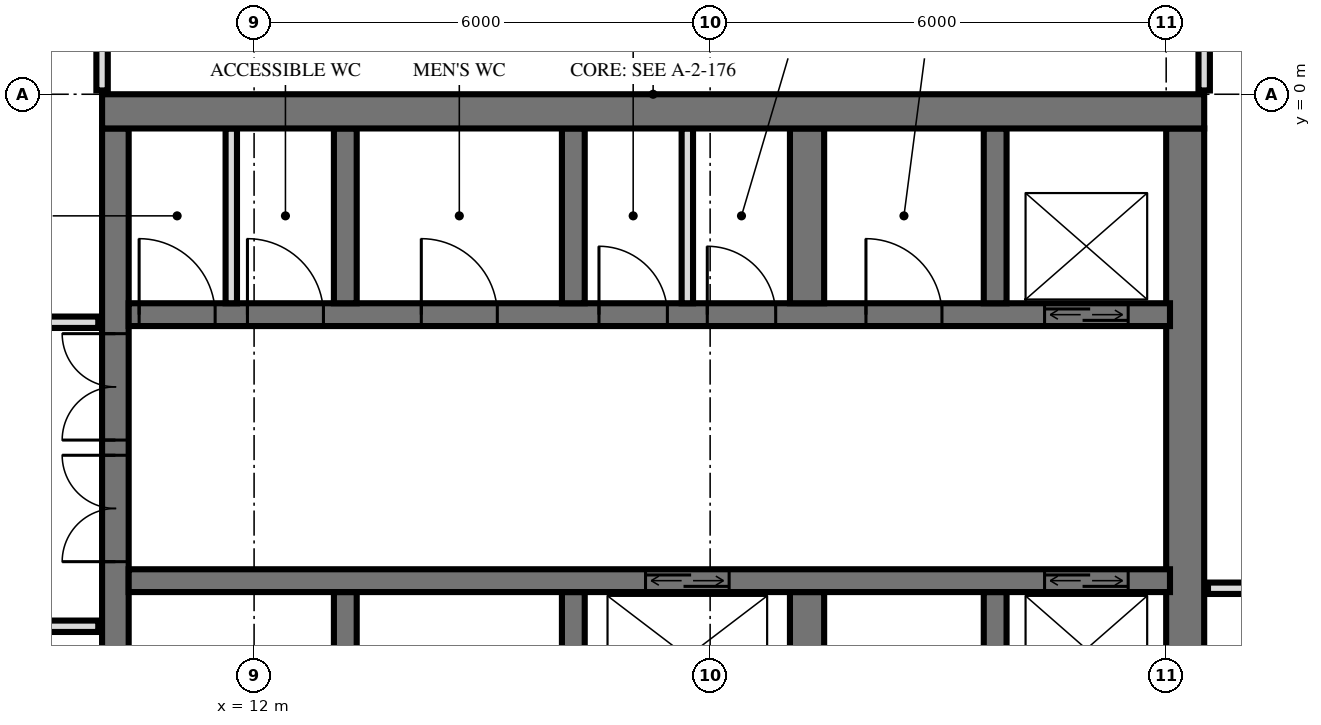
"""IFC4 building model, lengths in metres.
Left out: names, types, materials, properties, quantities, classifications, styles, units other than length and angle.
Written with IfcOpenShell. Run it as: python <this file> out.ifc"""

import sys

from ifc_helpers import new_model, si_unit, direction, frame, frame_2d, origin, place, context, subcontext, project, spatial, rectangle, extrude, element, fill, save


model = new_model("IFC4")
c1 = context("Model", 3, precision=1e-05, world=origin(), true_north=direction((0.0, 1.0)))
c2 = subcontext(c1, "Body", "Model", "MODEL_VIEW")
j1 = project(units=[si_unit("LENGTHUNIT", "METRE"), si_unit("PLANEANGLEUNIT", "RADIAN")], contexts=[c1])
p1 = place(None, origin())
s1 = spatial("IfcSite", under=j1, at=p1, CompositionType="ELEMENT")
p2 = place(p1, origin())
s2 = spatial("IfcBuilding", under=s1, at=p2, CompositionType="ELEMENT")
p3 = place(p2, frame((0.0, 0.0, 159.6)))
s3 = spatial("IfcBuildingStorey", under=s2, at=p3, CompositionType="ELEMENT", Elevation=159.6)
p4 = place(p3, frame((10.0, -0.225, 0.0), z_axis=(0.0, 0.0, 1.0), x_axis=(1.0, 0.0, 0.0)))
e1 = element("IfcWall", 1, at=p4, inside=s3, PredefinedType="SHEAR", context=c2, shape_type="SweptSolid", body=[
    extrude(rectangle(XDim=14.5, YDim=0.45, at=frame_2d((7.25, 0.0))), origin(), (0.0, 0.0, 1.0), 3.6),
])
p5 = place(p3, frame((10.175, -14.55, 0.0), z_axis=(0.0, 0.0, 1.0), x_axis=(0.0, 1.0, 0.0)))
e2 = element("IfcWall", 2, at=p5, inside=s3, PredefinedType="SHEAR", context=c2, shape_type="SweptSolid", body=[
    extrude(rectangle(XDim=14.1, YDim=0.35, at=frame_2d((7.05, 0.0))), origin(), (0.0, 0.0, 1.0), 3.6),
])
p6 = place(p5, frame((8.4, 0.0, 0.0)))
e3 = element("IfcOpeningElement", 3, at=p6, cuts=e2, PredefinedType="OPENING", context=c2, shape_type="SweptSolid", body=[
    extrude(rectangle(XDim=1.4, YDim=2.4, at=frame_2d((0.7, 1.2))), frame((0.0, 0.185, 0.0), z_axis=(0.0, -1.0, 0.0), x_axis=(1.0, 0.0, 0.0)), (0.0, 0.0, 1.0), 0.37),
])
p7 = place(p5, frame((10.0, 0.0, 0.0)))
e4 = element("IfcOpeningElement", 4, at=p7, cuts=e2, PredefinedType="OPENING", context=c2, shape_type="SweptSolid", body=[
    extrude(rectangle(XDim=1.4, YDim=2.4, at=frame_2d((0.7, 1.2))), frame((0.0, 0.185, 0.0), z_axis=(0.0, -1.0, 0.0), x_axis=(1.0, 0.0, 0.0)), (0.0, 0.0, 1.0), 0.37),
])
p8 = place(p5, frame((4.0, 0.0, 0.0)))
e5 = element("IfcOpeningElement", 5, at=p8, cuts=e2, PredefinedType="OPENING", context=c2, shape_type="SweptSolid", body=[
    extrude(rectangle(XDim=1.2, YDim=2.1, at=frame_2d((0.6, 1.05))), frame((0.0, 0.185, 0.0), z_axis=(0.0, -1.0, 0.0), x_axis=(1.0, 0.0, 0.0)), (0.0, 0.0, 1.0), 0.37),
])
p9 = place(p3, frame((24.25, -14.55, 0.0), z_axis=(0.0, 0.0, 1.0), x_axis=(0.0, 1.0, 0.0)))
e6 = element("IfcWall", 6, at=p9, inside=s3, PredefinedType="SHEAR", context=c2, shape_type="SweptSolid", body=[
    extrude(rectangle(XDim=14.1, YDim=0.5, at=frame_2d((7.05, 0.0))), origin(), (0.0, 0.0, 1.0), 3.6),
])
p10 = place(p3, frame((10.35, -2.9, 0.0), z_axis=(0.0, 0.0, 1.0), x_axis=(1.0, 0.0, 0.0)))
e7 = element("IfcWall", 7, at=p10, inside=s3, PredefinedType="SHEAR", context=c2, shape_type="SweptSolid", body=[
    extrude(rectangle(XDim=13.7, YDim=0.3, at=frame_2d((6.85, 0.0))), origin(), (0.0, 0.0, 1.0), 3.6),
])
p11 = place(p10, frame((12.05, 0.0, 0.0)))
e8 = element("IfcOpeningElement", 8, at=p11, cuts=e7, PredefinedType="OPENING", context=c2, shape_type="SweptSolid", body=[
    extrude(rectangle(XDim=1.1, YDim=2.1, at=frame_2d((0.55, 1.05))), frame((0.0, 0.16, 0.0), z_axis=(0.0, -1.0, 0.0), x_axis=(1.0, 0.0, 0.0)), (0.0, 0.0, 1.0), 0.32),
])
p12 = place(p10, frame((6.188, 0.0, 0.0)))
e9 = element("IfcOpeningElement", 9, at=p12, cuts=e7, PredefinedType="OPENING", context=c2, shape_type="SweptSolid", body=[
    extrude(rectangle(XDim=0.9, YDim=2.1, at=frame_2d((0.45, 1.05))), frame((0.0, 0.16, 0.0), z_axis=(0.0, -1.0, 0.0), x_axis=(1.0, 0.0, 0.0)), (0.0, 0.0, 1.0), 0.32),
])
p13 = place(p10, frame((7.613, 0.0, 0.0)))
e10 = element("IfcOpeningElement", 10, at=p13, cuts=e7, PredefinedType="OPENING", context=c2, shape_type="SweptSolid", body=[
    extrude(rectangle(XDim=0.9, YDim=2.1, at=frame_2d((0.45, 1.05))), frame((0.0, 0.16, 0.0), z_axis=(0.0, -1.0, 0.0), x_axis=(1.0, 0.0, 0.0)), (0.0, 0.0, 1.0), 0.32),
])
p14 = place(p10, frame((0.137, 0.0, 0.0)))
e11 = element("IfcOpeningElement", 11, at=p14, cuts=e7, PredefinedType="OPENING", context=c2, shape_type="SweptSolid", body=[
    extrude(rectangle(XDim=1.0, YDim=2.1, at=frame_2d((0.5, 1.05))), frame((0.0, 0.16, 0.0), z_axis=(0.0, -1.0, 0.0), x_axis=(1.0, 0.0, 0.0)), (0.0, 0.0, 1.0), 0.32),
])
p15 = place(p10, frame((1.562, 0.0, 0.0)))
e12 = element("IfcOpeningElement", 12, at=p15, cuts=e7, PredefinedType="OPENING", context=c2, shape_type="SweptSolid", body=[
    extrude(rectangle(XDim=1.0, YDim=2.1, at=frame_2d((0.5, 1.05))), frame((0.0, 0.16, 0.0), z_axis=(0.0, -1.0, 0.0), x_axis=(1.0, 0.0, 0.0)), (0.0, 0.0, 1.0), 0.32),
])
p16 = place(p10, frame((3.85, 0.0, 0.0)))
e13 = element("IfcOpeningElement", 13, at=p16, cuts=e7, PredefinedType="OPENING", context=c2, shape_type="SweptSolid", body=[
    extrude(rectangle(XDim=1.0, YDim=2.1, at=frame_2d((0.5, 1.05))), frame((0.0, 0.16, 0.0), z_axis=(0.0, -1.0, 0.0), x_axis=(1.0, 0.0, 0.0)), (0.0, 0.0, 1.0), 0.32),
])
p17 = place(p10, frame((9.7, 0.0, 0.0)))
e14 = element("IfcOpeningElement", 14, at=p17, cuts=e7, PredefinedType="OPENING", context=c2, shape_type="SweptSolid", body=[
    extrude(rectangle(XDim=1.0, YDim=2.1, at=frame_2d((0.5, 1.05))), frame((0.0, 0.16, 0.0), z_axis=(0.0, -1.0, 0.0), x_axis=(1.0, 0.0, 0.0)), (0.0, 0.0, 1.0), 0.32),
])
p18 = place(p3, frame((10.35, -6.4, 0.0), z_axis=(0.0, 0.0, 1.0), x_axis=(1.0, 0.0, 0.0)))
e15 = element("IfcWall", 15, at=p18, inside=s3, PredefinedType="SHEAR", context=c2, shape_type="SweptSolid", body=[
    extrude(rectangle(XDim=13.7, YDim=0.3, at=frame_2d((6.85, 0.0))), origin(), (0.0, 0.0, 1.0), 3.6),
])
p19 = place(p18, frame((12.05, 0.0, 0.0)))
e16 = element("IfcOpeningElement", 16, at=p19, cuts=e15, PredefinedType="OPENING", context=c2, shape_type="SweptSolid", body=[
    extrude(rectangle(XDim=1.1, YDim=2.1, at=frame_2d((0.55, 1.05))), frame((0.0, 0.16, 0.0), z_axis=(0.0, -1.0, 0.0), x_axis=(1.0, 0.0, 0.0)), (0.0, 0.0, 1.0), 0.32),
])
p20 = place(p18, frame((6.8, 0.0, 0.0)))
e17 = element("IfcOpeningElement", 17, at=p20, cuts=e15, PredefinedType="OPENING", context=c2, shape_type="SweptSolid", body=[
    extrude(rectangle(XDim=1.1, YDim=2.1, at=frame_2d((0.55, 1.05))), frame((0.0, 0.16, 0.0), z_axis=(0.0, -1.0, 0.0), x_axis=(1.0, 0.0, 0.0)), (0.0, 0.0, 1.0), 0.32),
])
for number, where, z_axis, x_axis in (
    (18, (13.2, -2.75, 0.0), (0.0, 0.0, 1.0), (0.0, 1.0, 0.0)),
    (19, (13.2, -8.85, 0.0), (0.0, 0.0, 1.0), (0.0, 1.0, 0.0)),
    (20, (16.2, -2.75, 0.0), (0.0, 0.0, 1.0), (0.0, 1.0, 0.0)),
    (21, (16.2, -8.85, 0.0), (0.0, 0.0, 1.0), (0.0, 1.0, 0.0)),
):
    element("IfcWall", number, at=place(p3, frame(where, z_axis=z_axis, x_axis=x_axis)), inside=s3, PredefinedType="SHEAR", context=c2, shape_type="SweptSolid", body=[
        extrude(rectangle(XDim=2.3, YDim=0.3, at=frame_2d((1.15, 0.0))), origin(), (0.0, 0.0, 1.0), 3.6),
    ])
for number, where, z_axis, x_axis in (
    (22, (19.275, -2.75, 0.0), (0.0, 0.0, 1.0), (0.0, 1.0, 0.0)),
    (23, (19.275, -8.85, 0.0), (0.0, 0.0, 1.0), (0.0, 1.0, 0.0)),
):
    element("IfcWall", number, at=place(p3, frame(where, z_axis=z_axis, x_axis=x_axis)), inside=s3, PredefinedType="SHEAR", context=c2, shape_type="SweptSolid", body=[
        extrude(rectangle(XDim=2.3, YDim=0.45, at=frame_2d((1.15, 0.0))), origin(), (0.0, 0.0, 1.0), 3.6),
    ])
for number, where, z_axis, x_axis in (
    (24, (21.75, -2.75, 0.0), (0.0, 0.0, 1.0), (0.0, 1.0, 0.0)),
    (25, (21.75, -8.85, 0.0), (0.0, 0.0, 1.0), (0.0, 1.0, 0.0)),
):
    element("IfcWall", number, at=place(p3, frame(where, z_axis=z_axis, x_axis=x_axis)), inside=s3, PredefinedType="SHEAR", context=c2, shape_type="SweptSolid", body=[
        extrude(rectangle(XDim=2.3, YDim=0.3, at=frame_2d((1.15, 0.0))), origin(), (0.0, 0.0, 1.0), 3.6),
    ])
for number, where, z_axis, x_axis in (
    (26, (17.7, -2.75, 0.0), (0.0, 0.0, 1.0), (0.0, 1.0, 0.0)),
    (27, (11.7, -2.75, 0.0), (0.0, 0.0, 1.0), (0.0, 1.0, 0.0)),
):
    element("IfcWall", number, at=place(p3, frame(where, z_axis=z_axis, x_axis=x_axis)), inside=s3, PredefinedType="PARTITIONING", context=c2, shape_type="SweptSolid", body=[
        extrude(rectangle(XDim=2.3, YDim=0.15, at=frame_2d((1.15, 0.0))), origin(), (0.0, 0.0, 1.0), 3.3),
    ])
p21 = place(p3, frame((24.5, 0.05, 0.0), z_axis=(0.0, 0.0, 1.0), x_axis=(0.0, 1.0, 0.0)))
e28 = element("IfcWall", 28, at=p21, inside=s3, PredefinedType="PARTITIONING", context=c2, shape_type="SweptSolid", body=[
    extrude(rectangle(XDim=0.807, YDim=0.15, at=frame_2d((0.404, 0.0))), origin(), (0.0, 0.0, 1.0), 3.32),
])
p22 = place(p3, frame((10.0, 0.05, 0.0), z_axis=(0.0, 0.0, 1.0), x_axis=(0.0, 1.0, 0.0)))
e29 = element("IfcWall", 29, at=p22, inside=s3, PredefinedType="PARTITIONING", context=c2, shape_type="SweptSolid", body=[
    extrude(rectangle(XDim=0.97, YDim=0.15, at=frame_2d((0.485, 0.0))), origin(), (0.0, 0.0, 1.0), 3.32),
])
p23 = place(p3, frame((-9.95, -7.0, 0.0), z_axis=(0.0, 0.0, 1.0), x_axis=(1.0, 0.0, 0.0)))
e30 = element("IfcWall", 30, at=p23, inside=s3, PredefinedType="PARTITIONING", context=c2, shape_type="SweptSolid", body=[
    extrude(rectangle(XDim=19.9, YDim=0.15, at=frame_2d((9.95, 0.0))), origin(), (0.0, 0.0, 1.0), 3.32),
])
p24 = place(p23, frame((9.45, 0.0, 0.0)))
e31 = element("IfcOpeningElement", 31, at=p24, cuts=e30, PredefinedType="OPENING", context=c2, shape_type="SweptSolid", body=[
    extrude(rectangle(XDim=1.0, YDim=2.1, at=frame_2d((0.5, 1.05))), frame((0.0, 0.085, 0.0), z_axis=(0.0, -1.0, 0.0), x_axis=(1.0, 0.0, 0.0)), (0.0, 0.0, 1.0), 0.17),
])
p25 = place(p23, frame((3.45, 0.0, 0.0)))
e32 = element("IfcOpeningElement", 32, at=p25, cuts=e30, PredefinedType="OPENING", context=c2, shape_type="SweptSolid", body=[
    extrude(rectangle(XDim=1.0, YDim=2.1, at=frame_2d((0.5, 1.05))), frame((0.0, 0.085, 0.0), z_axis=(0.0, -1.0, 0.0), x_axis=(1.0, 0.0, 0.0)), (0.0, 0.0, 1.0), 0.17),
])
p26 = place(p3, frame((24.55, -6.5, 0.0), z_axis=(0.0, 0.0, 1.0), x_axis=(1.0, 0.0, 0.0)))
e33 = element("IfcWall", 33, at=p26, inside=s3, PredefinedType="PARTITIONING", context=c2, shape_type="SweptSolid", body=[
    extrude(rectangle(XDim=3.47, YDim=0.15, at=frame_2d((1.735, 0.0))), origin(), (0.0, 0.0, 1.0), 3.32),
])
p27 = place(p26, frame((1.35, 0.0, 0.0)))
e34 = element("IfcOpeningElement", 34, at=p27, cuts=e33, PredefinedType="OPENING", context=c2, shape_type="SweptSolid", body=[
    extrude(rectangle(XDim=0.9, YDim=2.1, at=frame_2d((0.45, 1.05))), frame((0.0, 0.085, 0.0), z_axis=(0.0, -1.0, 0.0), x_axis=(1.0, 0.0, 0.0)), (0.0, 0.0, 1.0), 0.17),
])
p28 = place(p3, frame((-9.95, -3.0, 0.0), z_axis=(0.0, 0.0, 1.0), x_axis=(1.0, 0.0, 0.0)))
e35 = element("IfcWall", 35, at=p28, inside=s3, PredefinedType="PARTITIONING", context=c2, shape_type="SweptSolid", body=[
    extrude(rectangle(XDim=19.9, YDim=0.15, at=frame_2d((9.95, 0.0))), origin(), (0.0, 0.0, 1.0), 3.32),
])
p29 = place(p28, frame((1.45, 0.0, 0.0)))
e36 = element("IfcOpeningElement", 36, at=p29, cuts=e35, PredefinedType="OPENING", context=c2, shape_type="SweptSolid", body=[
    extrude(rectangle(XDim=1.0, YDim=2.1, at=frame_2d((0.5, 1.05))), frame((0.0, 0.085, 0.0), z_axis=(0.0, -1.0, 0.0), x_axis=(1.0, 0.0, 0.0)), (0.0, 0.0, 1.0), 0.17),
])
p30 = place(p28, frame((4.95, 0.0, 0.0)))
e37 = element("IfcOpeningElement", 37, at=p30, cuts=e35, PredefinedType="OPENING", context=c2, shape_type="SweptSolid", body=[
    extrude(rectangle(XDim=1.0, YDim=2.1, at=frame_2d((0.5, 1.05))), frame((0.0, 0.085, 0.0), z_axis=(0.0, -1.0, 0.0), x_axis=(1.0, 0.0, 0.0)), (0.0, 0.0, 1.0), 0.17),
])
p31 = place(p28, frame((7.7, 0.0, 0.0)))
e38 = element("IfcOpeningElement", 38, at=p31, cuts=e35, PredefinedType="OPENING", context=c2, shape_type="SweptSolid", body=[
    extrude(rectangle(XDim=1.0, YDim=2.1, at=frame_2d((0.5, 1.05))), frame((0.0, 0.085, 0.0), z_axis=(0.0, -1.0, 0.0), x_axis=(1.0, 0.0, 0.0)), (0.0, 0.0, 1.0), 0.17),
])
p32 = place(p28, frame((14.2, 0.0, 0.0)))
e39 = element("IfcOpeningElement", 39, at=p32, cuts=e35, PredefinedType="OPENING", context=c2, shape_type="SweptSolid", body=[
    extrude(rectangle(XDim=1.0, YDim=2.1, at=frame_2d((0.5, 1.05))), frame((0.0, 0.085, 0.0), z_axis=(0.0, -1.0, 0.0), x_axis=(1.0, 0.0, 0.0)), (0.0, 0.0, 1.0), 0.17),
])
p33 = place(p11, origin())
e40 = element("IfcDoor", 40, at=p33, inside=s3, OperationType="DOUBLE_DOOR_SLIDING", PredefinedType="USERDEFINED", context=c2, shape_type="SweptSolid", body=[
    extrude(rectangle(XDim=1.1, YDim=2.1, at=frame_2d((0.55, 1.05))), frame((0.0, 0.025, 0.0), z_axis=(0.0, -1.0, 0.0), x_axis=(1.0, 0.0, 0.0)), (0.0, 0.0, 1.0), 0.05),
])
fill(e8, e40)
p34 = place(p19, origin())
e41 = element("IfcDoor", 41, at=p34, inside=s3, OperationType="DOUBLE_DOOR_SLIDING", PredefinedType="USERDEFINED", context=c2, shape_type="SweptSolid", body=[
    extrude(rectangle(XDim=1.1, YDim=2.1, at=frame_2d((0.55, 1.05))), frame((0.0, 0.025, 0.0), z_axis=(0.0, -1.0, 0.0), x_axis=(1.0, 0.0, 0.0)), (0.0, 0.0, 1.0), 0.05),
])
fill(e16, e41)
p35 = place(p20, origin())
e42 = element("IfcDoor", 42, at=p35, inside=s3, OperationType="DOUBLE_DOOR_SLIDING", PredefinedType="USERDEFINED", context=c2, shape_type="SweptSolid", body=[
    extrude(rectangle(XDim=1.1, YDim=2.1, at=frame_2d((0.55, 1.05))), frame((0.0, 0.025, 0.0), z_axis=(0.0, -1.0, 0.0), x_axis=(1.0, 0.0, 0.0)), (0.0, 0.0, 1.0), 0.05),
])
fill(e17, e42)
p36 = place(p6, origin())
e43 = element("IfcDoor", 43, at=p36, inside=s3, OperationType="DOUBLE_DOOR_SINGLE_SWING", PredefinedType="DOOR", context=c2, shape_type="SweptSolid", body=[
    extrude(rectangle(XDim=1.4, YDim=2.4, at=frame_2d((0.7, 1.2))), frame((0.0, 0.025, 0.0), z_axis=(0.0, -1.0, 0.0), x_axis=(1.0, 0.0, 0.0)), (0.0, 0.0, 1.0), 0.05),
])
fill(e3, e43)
p37 = place(p7, origin())
e44 = element("IfcDoor", 44, at=p37, inside=s3, OperationType="DOUBLE_DOOR_SINGLE_SWING", PredefinedType="DOOR", context=c2, shape_type="SweptSolid", body=[
    extrude(rectangle(XDim=1.4, YDim=2.4, at=frame_2d((0.7, 1.2))), frame((0.0, 0.025, 0.0), z_axis=(0.0, -1.0, 0.0), x_axis=(1.0, 0.0, 0.0)), (0.0, 0.0, 1.0), 0.05),
])
fill(e4, e44)
p38 = place(p12, origin())
e45 = element("IfcDoor", 45, at=p38, inside=s3, OperationType="SINGLE_SWING_RIGHT", PredefinedType="DOOR", context=c2, shape_type="SweptSolid", body=[
    extrude(rectangle(XDim=0.9, YDim=2.1, at=frame_2d((0.45, 1.05))), frame((0.0, 0.025, 0.0), z_axis=(0.0, -1.0, 0.0), x_axis=(1.0, 0.0, 0.0)), (0.0, 0.0, 1.0), 0.05),
])
fill(e9, e45)
p39 = place(p13, origin())
e46 = element("IfcDoor", 46, at=p39, inside=s3, OperationType="SINGLE_SWING_RIGHT", PredefinedType="DOOR", context=c2, shape_type="SweptSolid", body=[
    extrude(rectangle(XDim=0.9, YDim=2.1, at=frame_2d((0.45, 1.05))), frame((0.0, 0.025, 0.0), z_axis=(0.0, -1.0, 0.0), x_axis=(1.0, 0.0, 0.0)), (0.0, 0.0, 1.0), 0.05),
])
fill(e10, e46)
p40 = place(p14, origin())
e47 = element("IfcDoor", 47, at=p40, inside=s3, OperationType="SINGLE_SWING_RIGHT", PredefinedType="DOOR", context=c2, shape_type="SweptSolid", body=[
    extrude(rectangle(XDim=1.0, YDim=2.1, at=frame_2d((0.5, 1.05))), frame((0.0, 0.025, 0.0), z_axis=(0.0, -1.0, 0.0), x_axis=(1.0, 0.0, 0.0)), (0.0, 0.0, 1.0), 0.05),
])
fill(e11, e47)
p41 = place(p15, origin())
e48 = element("IfcDoor", 48, at=p41, inside=s3, OperationType="SINGLE_SWING_RIGHT", PredefinedType="DOOR", context=c2, shape_type="SweptSolid", body=[
    extrude(rectangle(XDim=1.0, YDim=2.1, at=frame_2d((0.5, 1.05))), frame((0.0, 0.025, 0.0), z_axis=(0.0, -1.0, 0.0), x_axis=(1.0, 0.0, 0.0)), (0.0, 0.0, 1.0), 0.05),
])
fill(e12, e48)
p42 = place(p16, origin())
e49 = element("IfcDoor", 49, at=p42, inside=s3, OperationType="SINGLE_SWING_RIGHT", PredefinedType="DOOR", context=c2, shape_type="SweptSolid", body=[
    extrude(rectangle(XDim=1.0, YDim=2.1, at=frame_2d((0.5, 1.05))), frame((0.0, 0.025, 0.0), z_axis=(0.0, -1.0, 0.0), x_axis=(1.0, 0.0, 0.0)), (0.0, 0.0, 1.0), 0.05),
])
fill(e13, e49)
p43 = place(p17, origin())
e50 = element("IfcDoor", 50, at=p43, inside=s3, OperationType="SINGLE_SWING_RIGHT", PredefinedType="DOOR", context=c2, shape_type="SweptSolid", body=[
    extrude(rectangle(XDim=1.0, YDim=2.1, at=frame_2d((0.5, 1.05))), frame((0.0, 0.025, 0.0), z_axis=(0.0, -1.0, 0.0), x_axis=(1.0, 0.0, 0.0)), (0.0, 0.0, 1.0), 0.05),
])
fill(e14, e50)
save(model, sys.argv[1])
